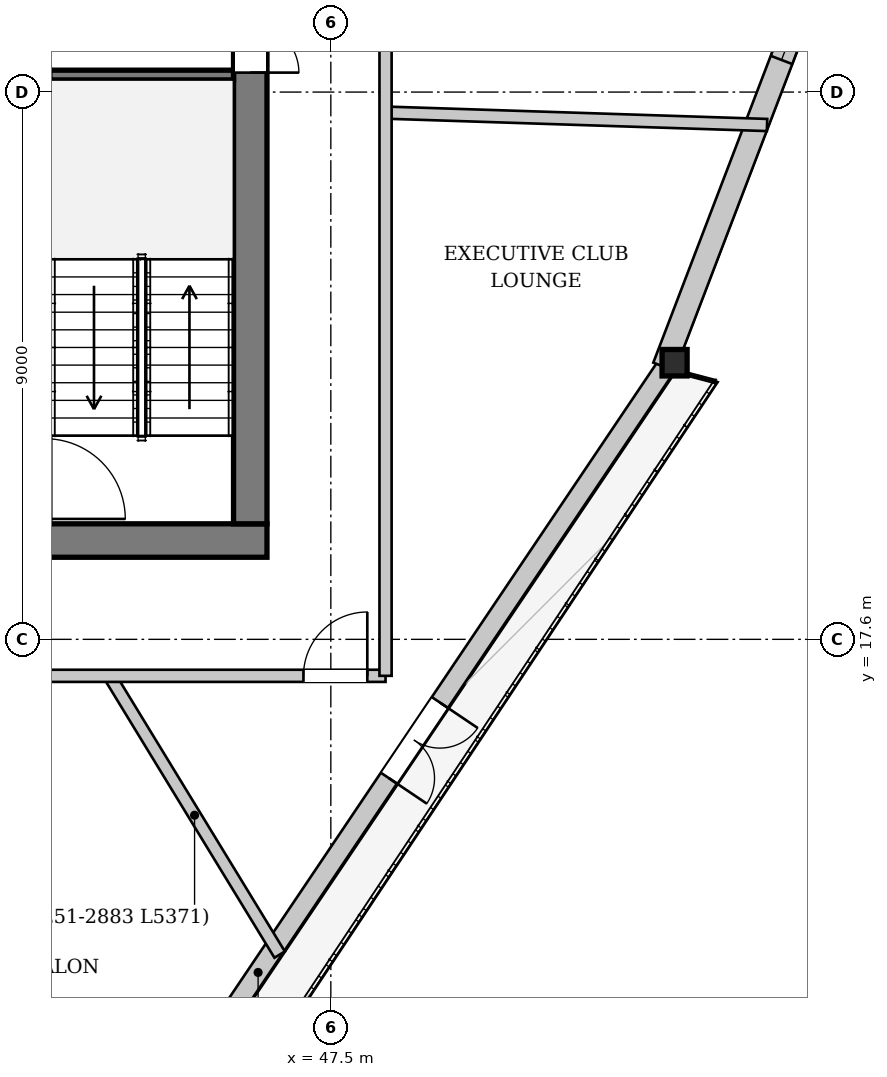
"""IFC4 building model, lengths in metres.
Left out: names, types, materials, properties, quantities, classifications, styles, units other than length and angle.
Written with IfcOpenShell. Run it as: python <this file> out.ifc"""

import sys

from ifc_helpers import new_model, si_unit, direction, frame, frame_2d, origin, origin_2d, place, context, subcontext, project, spatial, rectangle, i_section, extrude, source, transform, mapped, element, fill, save


model = new_model("IFC4")
c1 = context("Model", 3, precision=1e-05, world=origin(), true_north=direction((0.0, 1.0)))
c2 = subcontext(c1, "Body", "Model", "MODEL_VIEW")
j1 = project(units=[si_unit("LENGTHUNIT", "METRE"), si_unit("PLANEANGLEUNIT", "RADIAN")], contexts=[c1])
p1 = place(None, origin())
s1 = spatial("IfcSite", under=j1, at=p1, CompositionType="ELEMENT")
p2 = place(p1, origin())
s2 = spatial("IfcBuilding", under=s1, at=p2, CompositionType="ELEMENT")
p3 = place(p2, frame((0.0, 0.0, 192.75)))
s3 = spatial("IfcBuildingStorey", under=s2, at=p3, CompositionType="ELEMENT", Elevation=192.75)
m1 = source(origin(), c2, "Body", "SweptSolid", [
    extrude(i_section(OverallWidth=0.412, OverallDepth=0.435, WebThickness=0.031, FlangeThickness=0.05, at=origin_2d()), origin(), (0.0, 0.0, 1.0), 3.396),
])
p4 = place(p3, frame((53.158, 22.014, 0.0), z_axis=(-0.002875831561, 0.079444846862, 0.9968351147), x_axis=(-0.999345455963, -0.036175401121, 0.0)))
e1 = element("IfcColumn", 1, at=p4, inside=s3, PredefinedType="COLUMN", context=c2, shape_type="MappedRepresentation", body=[
    mapped(m1, transform((0.0, 0.0, 0.0), x_axis=(1.0, 0.0, 0.0), y_axis=(0.0, 1.0, 0.0), z_axis=(0.0, 0.0, 1.0), scale=1.0)),
])
p5 = place(p3, frame((53.026, 22.104, 0.0), z_axis=(0.0, 0.0, 1.0), x_axis=(-0.558570859801, -0.829456806941, 0.0)))
e2 = element("IfcWall", 2, at=p5, inside=s3, PredefinedType="SOLIDWALL", context=c2, shape_type="SweptSolid", body=[
    extrude(rectangle(XDim=23.224, YDim=0.32, at=frame_2d((11.612, 0.0))), origin(), (0.0, 0.0, 1.0), 2.722),
])
p6 = place(p5, frame((6.682, 0.0, 0.0)))
e3 = element("IfcOpeningElement", 3, at=p6, cuts=e2, PredefinedType="OPENING", context=c2, shape_type="SweptSolid", body=[
    extrude(rectangle(XDim=1.5, YDim=2.3, at=frame_2d((0.75, 1.15))), frame((0.0, 0.17, 0.0), z_axis=(0.0, -1.0, 0.0), x_axis=(1.0, 0.0, 0.0)), (0.0, 0.0, 1.0), 0.34),
])
p7 = place(p5, frame((15.886, 0.0, 0.252)))
e4 = element("IfcOpeningElement", 4, at=p7, cuts=e2, PredefinedType="OPENING", context=c2, shape_type="SweptSolid", body=[
    extrude(rectangle(XDim=2.6, YDim=2.35, at=frame_2d((1.3, 1.175))), frame((0.0, 0.17, 0.0), z_axis=(0.0, -1.0, 0.0), x_axis=(1.0, 0.0, 0.0)), (0.0, 0.0, 1.0), 0.34),
])
p8 = place(p3, frame((61.283, 43.772, 0.0), z_axis=(0.0, 0.0, 1.0), x_axis=(-0.357452785868, -0.933931210462, 0.0)))
e5 = element("IfcWall", 5, at=p8, inside=s3, PredefinedType="SOLIDWALL", context=c2, shape_type="SweptSolid", body=[
    extrude(rectangle(XDim=23.224, YDim=0.38, at=frame_2d((11.612, 0.0))), origin(), (0.0, 0.0, 1.0), 2.722),
])
p9 = place(p8, frame((5.403, 0.0, 0.352)))
e6 = element("IfcOpeningElement", 6, at=p9, cuts=e5, PredefinedType="OPENING", context=c2, shape_type="SweptSolid", body=[
    extrude(rectangle(XDim=2.2, YDim=2.25, at=frame_2d((1.1, 1.125))), frame((0.0, 0.2, 0.0), z_axis=(0.0, -1.0, 0.0), x_axis=(1.0, 0.0, 0.0)), (0.0, 0.0, 1.0), 0.4),
])
p10 = place(p8, frame((15.621, 0.0, 0.352)))
e7 = element("IfcOpeningElement", 7, at=p10, cuts=e5, PredefinedType="OPENING", context=c2, shape_type="SweptSolid", body=[
    extrude(rectangle(XDim=2.2, YDim=2.25, at=frame_2d((1.1, 1.125))), frame((0.0, 0.2, 0.0), z_axis=(0.0, -1.0, 0.0), x_axis=(1.0, 0.0, 0.0)), (0.0, 0.0, 1.0), 0.4),
])
p11 = place(p3, frame((46.45, 19.225, 0.0), z_axis=(0.0, 0.0, 1.0), x_axis=(-1.0, 0.0, 0.0)))
e8 = element("IfcWall", 8, at=p11, inside=s3, PredefinedType="SHEAR", context=c2, shape_type="SweptSolid", body=[
    extrude(rectangle(XDim=16.9, YDim=0.55, at=frame_2d((8.45, 0.0))), origin(), (0.0, 0.0, 1.0), 3.33),
])
p12 = place(p11, frame((4.65, 0.0, 0.0)))
e9 = element("IfcOpeningElement", 9, at=p12, cuts=e8, PredefinedType="OPENING", context=c2, shape_type="SweptSolid", body=[
    extrude(rectangle(XDim=1.12, YDim=2.25, at=frame_2d((0.56, 1.125))), frame((0.0, 0.285, 0.0), z_axis=(0.0, -1.0, 0.0), x_axis=(1.0, 0.0, 0.0)), (0.0, 0.0, 1.0), 0.57),
])
p13 = place(p11, frame((11.15, 0.0, 0.0)))
e10 = element("IfcOpeningElement", 10, at=p13, cuts=e8, PredefinedType="OPENING", context=c2, shape_type="SweptSolid", body=[
    extrude(rectangle(XDim=1.12, YDim=2.25, at=frame_2d((0.56, 1.125))), frame((0.0, 0.285, 0.0), z_axis=(0.0, -1.0, 0.0), x_axis=(1.0, 0.0, 0.0)), (0.0, 0.0, 1.0), 0.57),
])
p14 = place(p3, frame((46.175, 33.7, 0.0), z_axis=(0.0, 0.0, 1.0), x_axis=(0.0, -1.0, 0.0)))
e11 = element("IfcWall", 11, at=p14, inside=s3, PredefinedType="SHEAR", context=c2, shape_type="SweptSolid", body=[
    extrude(rectangle(XDim=14.2, YDim=0.55, at=frame_2d((7.1, 0.0))), origin(), (0.0, 0.0, 1.0), 3.33),
])
p15 = place(p14, frame((5.18, 0.0, 0.0)))
e12 = element("IfcOpeningElement", 12, at=p15, cuts=e11, PredefinedType="OPENING", context=c2, shape_type="SweptSolid", body=[
    extrude(rectangle(XDim=1.6, YDim=2.2, at=frame_2d((0.8, 1.1))), frame((0.0, 0.285, 0.0), z_axis=(0.0, -1.0, 0.0), x_axis=(1.0, 0.0, 0.0)), (0.0, 0.0, 1.0), 0.57),
])
p16 = place(p14, frame((2.05, 0.0, 0.0)))
e13 = element("IfcOpeningElement", 13, at=p16, cuts=e11, PredefinedType="OPENING", context=c2, shape_type="SweptSolid", body=[
    extrude(rectangle(XDim=0.95, YDim=2.1, at=frame_2d((0.475, 1.05))), frame((0.0, 0.285, 0.0), z_axis=(0.0, -1.0, 0.0), x_axis=(1.0, 0.0, 0.0)), (0.0, 0.0, 1.0), 0.57),
])
p17 = place(p3, frame((42.88, 26.88, 0.0), z_axis=(0.0, 0.0, 1.0), x_axis=(1.0, 0.0, 0.0)))
e14 = element("IfcWall", 14, at=p17, inside=s3, PredefinedType="PARTITIONING", context=c2, shape_type="SweptSolid", body=[
    extrude(rectangle(XDim=3.02, YDim=0.16, at=frame_2d((1.51, 0.0))), origin(), (0.0, 0.0, 1.0), 3.33),
])
p18 = place(p3, frame((43.86, 17.0, 0.0), z_axis=(0.0, 0.0, 1.0), x_axis=(0.521004990477, -0.853553630359, 0.0)))
e15 = element("IfcWall", 15, at=p18, inside=s3, PredefinedType="PARTITIONING", context=c2, shape_type="SweptSolid", body=[
    extrude(rectangle(XDim=5.371, YDim=0.2, at=frame_2d((2.686, 0.0))), origin(), (0.0, 0.0, 1.0), 3.33),
])
p19 = place(p3, frame((48.4, 26.262, 0.0), z_axis=(0.0, 0.0, 1.0), x_axis=(0.999472608607, -0.032473137284, 0.0)))
e16 = element("IfcWall", 16, at=p19, inside=s3, PredefinedType="PARTITIONING", context=c2, shape_type="SweptSolid", body=[
    extrude(rectangle(XDim=6.278, YDim=0.2, at=frame_2d((3.139, 0.0))), origin(), (0.0, 0.0, 1.0), 3.33),
])
p20 = place(p3, frame((27.6, 17.0, 0.0), z_axis=(0.0, 0.0, 1.0), x_axis=(1.0, 0.0, 0.0)))
e17 = element("IfcWall", 17, at=p20, inside=s3, PredefinedType="PARTITIONING", context=c2, shape_type="SweptSolid", body=[
    extrude(rectangle(XDim=20.8, YDim=0.2, at=frame_2d((10.4, 0.0))), origin(), (0.0, 0.0, 1.0), 3.33),
])
p21 = place(p20, frame((19.45, 0.0, 0.0)))
e18 = element("IfcOpeningElement", 18, at=p21, cuts=e17, PredefinedType="OPENING", context=c2, shape_type="SweptSolid", body=[
    extrude(rectangle(XDim=1.05, YDim=2.2, at=frame_2d((0.525, 1.1))), frame((0.0, 0.11, 0.0), z_axis=(0.0, -1.0, 0.0), x_axis=(1.0, 0.0, 0.0)), (0.0, 0.0, 1.0), 0.22),
])
p22 = place(p20, frame((5.239, 0.0, 0.0)))
e19 = element("IfcOpeningElement", 19, at=p22, cuts=e17, PredefinedType="OPENING", context=c2, shape_type="SweptSolid", body=[
    extrude(rectangle(XDim=1.05, YDim=2.2, at=frame_2d((0.525, 1.1))), frame((0.0, 0.11, 0.0), z_axis=(0.0, -1.0, 0.0), x_axis=(1.0, 0.0, 0.0)), (0.0, 0.0, 1.0), 0.22),
])
p23 = place(p20, frame((12.653, 0.0, 0.0)))
e20 = element("IfcOpeningElement", 20, at=p23, cuts=e17, PredefinedType="OPENING", context=c2, shape_type="SweptSolid", body=[
    extrude(rectangle(XDim=1.05, YDim=2.2, at=frame_2d((0.525, 1.1))), frame((0.0, 0.11, 0.0), z_axis=(0.0, -1.0, 0.0), x_axis=(1.0, 0.0, 0.0)), (0.0, 0.0, 1.0), 0.22),
])
p24 = place(p3, frame((48.4, 17.0, 0.0), z_axis=(0.0, 0.0, 1.0), x_axis=(0.0, 1.0, 0.0)))
e21 = element("IfcWall", 21, at=p24, inside=s3, PredefinedType="PARTITIONING", context=c2, shape_type="SweptSolid", body=[
    extrude(rectangle(XDim=19.2, YDim=0.2, at=frame_2d((9.6, 0.0))), origin(), (0.0, 0.0, 1.0), 3.33),
])
m2 = source(origin(), c2, "Body", "SweptSolid", [
    extrude(rectangle(XDim=1.5, YDim=2.3, at=frame_2d((0.75, 1.15))), frame((0.0, 0.025, 0.0), z_axis=(0.0, -1.0, 0.0), x_axis=(1.0, 0.0, 0.0)), (0.0, 0.0, 1.0), 0.05),
])
p25 = place(p6, origin())
e22 = element("IfcDoor", 22, at=p25, inside=s3, OperationType="DOUBLE_DOOR_SINGLE_SWING", PredefinedType="DOOR", context=c2, shape_type="MappedRepresentation", body=[
    mapped(m2, transform((0.0, 0.0, 0.0), x_axis=(1.0, 0.0, 0.0), y_axis=(0.0, 1.0, 0.0), z_axis=(0.0, 0.0, 1.0), scale=1.0)),
])
fill(e3, e22)
m3 = source(origin(), c2, "Body", "SweptSolid", [
    extrude(rectangle(XDim=2.2, YDim=2.25, at=frame_2d((1.1, 1.125))), frame((0.0, 0.03, 0.0), z_axis=(0.0, -1.0, 0.0), x_axis=(1.0, 0.0, 0.0)), (0.0, 0.0, 1.0), 0.06),
])
p26 = place(p10, origin())
e23 = element("IfcWindow", 23, at=p26, inside=s3, PartitioningType="SINGLE_PANEL", PredefinedType="WINDOW", context=c2, shape_type="MappedRepresentation", body=[
    mapped(m3, transform((0.0, 0.0, 0.0), x_axis=(1.0, 0.0, 0.0), y_axis=(0.0, 1.0, 0.0), z_axis=(0.0, 0.0, 1.0), scale=1.0)),
])
fill(e7, e23)
m4 = source(origin(), c2, "Body", "SweptSolid", [
    extrude(rectangle(XDim=1.6, YDim=2.2, at=frame_2d((0.8, 1.1))), frame((0.0, 0.025, 0.0), z_axis=(0.0, -1.0, 0.0), x_axis=(1.0, 0.0, 0.0)), (0.0, 0.0, 1.0), 0.05),
])
p27 = place(p15, origin())
e24 = element("IfcDoor", 24, at=p27, inside=s3, OperationType="DOUBLE_DOOR_SINGLE_SWING", PredefinedType="DOOR", context=c2, shape_type="MappedRepresentation", body=[
    mapped(m4, transform((0.0, 0.0, 0.0), x_axis=(1.0, 0.0, 0.0), y_axis=(0.0, 1.0, 0.0), z_axis=(0.0, 0.0, 1.0), scale=1.0)),
])
fill(e12, e24)
m5 = source(origin(), c2, "Body", "SweptSolid", [
    extrude(rectangle(XDim=1.05, YDim=2.2, at=frame_2d((0.525, 1.1))), frame((0.0, 0.025, 0.0), z_axis=(0.0, -1.0, 0.0), x_axis=(1.0, 0.0, 0.0)), (0.0, 0.0, 1.0), 0.05),
])
p28 = place(p21, origin())
e25 = element("IfcDoor", 25, at=p28, inside=s3, OperationType="SINGLE_SWING_RIGHT", PredefinedType="DOOR", context=c2, shape_type="MappedRepresentation", body=[
    mapped(m5, transform((0.0, 0.0, 0.0), x_axis=(1.0, 0.0, 0.0), y_axis=(0.0, 1.0, 0.0), z_axis=(0.0, 0.0, 1.0), scale=1.0)),
])
fill(e18, e25)
save(model, sys.argv[1])
